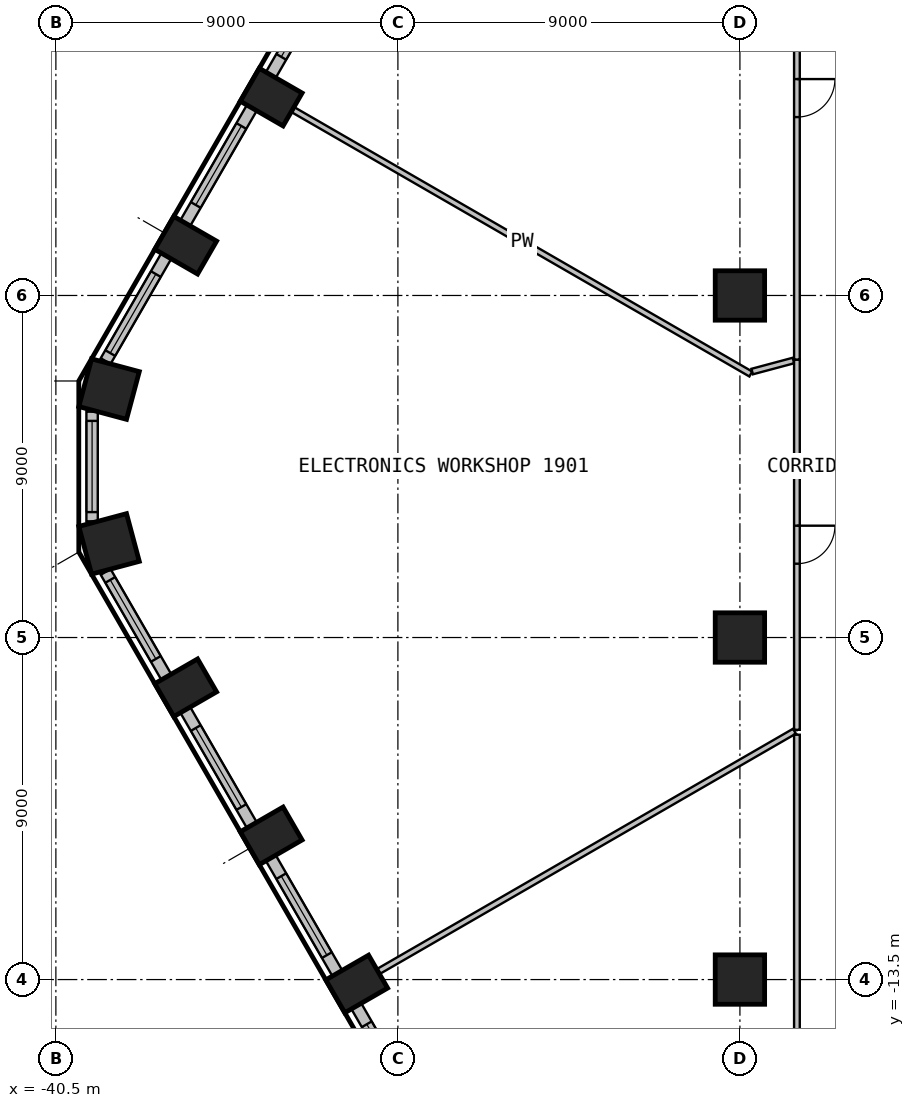
"""IFC4 building model, lengths in metres.
Left out: names, types, materials, properties, quantities, classifications, styles, units other than length and angle.
Written with IfcOpenShell. Run it as: python <this file> out.ifc"""

import sys

from ifc_helpers import new_model, si_unit, direction, frame, frame_2d, origin, origin_2d, place, context, subcontext, project, spatial, rectangle, circle, extrude, element, fill, save


model = new_model("IFC4")
c1 = context("Model", 3, precision=1e-05, world=origin(), true_north=direction((0.0, 1.0)))
c2 = subcontext(c1, "Body", "Model", "MODEL_VIEW")
j1 = project(units=[si_unit("LENGTHUNIT", "METRE"), si_unit("PLANEANGLEUNIT", "RADIAN")], contexts=[c1])
p1 = place(None, origin())
s1 = spatial("IfcSite", under=j1, at=p1, CompositionType="ELEMENT")
p2 = place(p1, origin())
s2 = spatial("IfcBuilding", under=s1, at=p2, CompositionType="ELEMENT")
p3 = place(p2, frame((0.0, 0.0, 81.3)))
s3 = spatial("IfcBuildingStorey", under=s2, at=p3, CompositionType="ELEMENT", Elevation=81.3)
for number, where, z_axis, x_axis in (
    (1, (-34.834, 9.719, 0.0), (0.0, 0.0, 1.0), (-0.5, -0.866, 0.0)),
    (2, (-37.084, 5.822, 0.0), (0.0, 0.0, 1.0), (-0.5, -0.866, 0.0)),
):
    element("IfcColumn", number, at=place(p3, frame(where, z_axis=z_axis, x_axis=x_axis)), inside=s3, PredefinedType="COLUMN", context=c2, shape_type="SweptSolid", body=[
        extrude(rectangle(XDim=1.0, YDim=1.3, at=origin_2d()), origin(), (0.0, 0.0, 1.0), 3.525),
    ])
for number, where, z_axis, x_axis in (
    (3, (-39.101, 2.037, 0.0), (0.0, 0.0, 1.0), (-0.259, -0.966, 0.0)),
    (4, (-39.101, -2.037, 0.0), (0.0, 0.0, 1.0), (0.259, -0.966, 0.0)),
):
    element("IfcColumn", number, at=place(p3, frame(where, z_axis=z_axis, x_axis=x_axis)), inside=s3, PredefinedType="COLUMN", context=c2, shape_type="SweptSolid", body=[
        extrude(rectangle(XDim=1.3, YDim=1.3, at=origin_2d()), origin(), (0.0, 0.0, 1.0), 3.525),
    ])
for number, where, z_axis, x_axis in (
    (5, (-37.084, -5.822, 0.0), (0.0, 0.0, 1.0), (0.5, -0.866, 0.0)),
    (6, (-34.834, -9.719, 0.0), (0.0, 0.0, 1.0), (0.5, -0.866, 0.0)),
    (7, (-32.584, -13.616, 0.0), (0.0, 0.0, 1.0), (0.5, -0.866, 0.0)),
):
    element("IfcColumn", number, at=place(p3, frame(where, z_axis=z_axis, x_axis=x_axis)), inside=s3, PredefinedType="COLUMN", context=c2, shape_type="SweptSolid", body=[
        extrude(rectangle(XDim=1.0, YDim=1.3, at=origin_2d()), origin(), (0.0, 0.0, 1.0), 3.525),
    ])
for number, where, z_axis, x_axis in (
    (8, (-22.5, -13.5, 0.0), (0.0, 0.0, 1.0), (1.0, 0.0, 0.0)),
    (9, (-22.5, -4.5, 0.0), (0.0, 0.0, 1.0), (1.0, 0.0, 0.0)),
    (10, (-22.5, 4.5, 0.0), (0.0, 0.0, 1.0), (1.0, 0.0, 0.0)),
):
    element("IfcColumn", number, at=place(p3, frame(where, z_axis=z_axis, x_axis=x_axis)), inside=s3, PredefinedType="COLUMN", context=c2, shape_type="SweptSolid", body=[
        extrude(circle(Radius=0.65, at=origin_2d()), origin(), (0.0, 0.0, 1.0), 3.525),
    ])
p4 = place(p3, frame((-33.094, 13.333, 0.0), z_axis=(0.0, 0.0, 1.0), x_axis=(-0.499996256241, -0.866027565234, 0.0)))
e11 = element("IfcWall", 11, at=p4, inside=s3, PredefinedType="SOLIDWALL", context=c2, shape_type="SweptSolid", body=[
    extrude(rectangle(XDim=3.499, YDim=0.3, at=frame_2d((1.75, 0.0))), origin(), (0.0, 0.0, 1.0), 3.525),
])
p5 = place(p4, frame((0.55, 0.0, 0.9)))
e12 = element("IfcOpeningElement", 12, at=p5, cuts=e11, PredefinedType="OPENING", context=c2, shape_type="SweptSolid", body=[
    extrude(rectangle(XDim=2.4, YDim=2.1, at=frame_2d((1.2, 1.05))), frame((0.0, 0.16, 0.0), z_axis=(0.0, -1.0, 0.0), x_axis=(1.0, 0.0, 0.0)), (0.0, 0.0, 1.0), 0.32),
])
p6 = place(p3, frame((-35.344, 9.436, 0.0), z_axis=(0.0, 0.0, 1.0), x_axis=(-0.499996256241, -0.866027565234, 0.0)))
e13 = element("IfcWall", 13, at=p6, inside=s3, PredefinedType="SOLIDWALL", context=c2, shape_type="SweptSolid", body=[
    extrude(rectangle(XDim=3.499, YDim=0.3, at=frame_2d((1.75, 0.0))), origin(), (0.0, 0.0, 1.0), 3.525),
])
p7 = place(p6, frame((0.55, 0.0, 0.9)))
e14 = element("IfcOpeningElement", 14, at=p7, cuts=e13, PredefinedType="OPENING", context=c2, shape_type="SweptSolid", body=[
    extrude(rectangle(XDim=2.4, YDim=2.1, at=frame_2d((1.2, 1.05))), frame((0.0, 0.16, 0.0), z_axis=(0.0, -1.0, 0.0), x_axis=(1.0, 0.0, 0.0)), (0.0, 0.0, 1.0), 0.32),
])
p8 = place(p3, frame((-37.594, 5.539, 0.0), z_axis=(0.0, 0.0, 1.0), x_axis=(-0.500004907028, -0.866022570692, 0.0)))
e15 = element("IfcWall", 15, at=p8, inside=s3, PredefinedType="SOLIDWALL", context=c2, shape_type="SweptSolid", body=[
    extrude(rectangle(XDim=3.192, YDim=0.3, at=frame_2d((1.596, 0.0))), origin(), (0.0, 0.0, 1.0), 3.525),
])
p9 = place(p8, frame((0.55, 0.0, 0.9)))
e16 = element("IfcOpeningElement", 16, at=p9, cuts=e15, PredefinedType="OPENING", context=c2, shape_type="SweptSolid", body=[
    extrude(rectangle(XDim=2.4, YDim=2.1, at=frame_2d((1.2, 1.05))), frame((0.0, 0.16, 0.0), z_axis=(0.0, -1.0, 0.0), x_axis=(1.0, 0.0, 0.0)), (0.0, 0.0, 1.0), 0.32),
])
p10 = place(p3, frame((-39.547, 1.443, 0.0), z_axis=(0.0, 0.0, 1.0), x_axis=(0.0, -1.0, 0.0)))
e17 = element("IfcWall", 17, at=p10, inside=s3, PredefinedType="SOLIDWALL", context=c2, shape_type="SweptSolid", body=[
    extrude(rectangle(XDim=2.886, YDim=0.3, at=frame_2d((1.443, 0.0))), origin(), (0.0, 0.0, 1.0), 3.525),
])
p11 = place(p10, frame((0.243, 0.0, 0.9)))
e18 = element("IfcOpeningElement", 18, at=p11, cuts=e17, PredefinedType="OPENING", context=c2, shape_type="SweptSolid", body=[
    extrude(rectangle(XDim=2.4, YDim=2.1, at=frame_2d((1.2, 1.05))), frame((0.0, 0.16, 0.0), z_axis=(0.0, -1.0, 0.0), x_axis=(1.0, 0.0, 0.0)), (0.0, 0.0, 1.0), 0.32),
])
p12 = place(p3, frame((-39.19, -2.774, 0.0), z_axis=(0.0, 0.0, 1.0), x_axis=(0.500004907028, -0.866022570692, 0.0)))
e19 = element("IfcWall", 19, at=p12, inside=s3, PredefinedType="SOLIDWALL", context=c2, shape_type="SweptSolid", body=[
    extrude(rectangle(XDim=3.192, YDim=0.3, at=frame_2d((1.596, 0.0))), origin(), (0.0, 0.0, 1.0), 3.525),
])
p13 = place(p12, frame((0.243, 0.0, 0.9)))
e20 = element("IfcOpeningElement", 20, at=p13, cuts=e19, PredefinedType="OPENING", context=c2, shape_type="SweptSolid", body=[
    extrude(rectangle(XDim=2.4, YDim=2.1, at=frame_2d((1.2, 1.05))), frame((0.0, 0.16, 0.0), z_axis=(0.0, -1.0, 0.0), x_axis=(1.0, 0.0, 0.0)), (0.0, 0.0, 1.0), 0.32),
])
p14 = place(p3, frame((-37.094, -6.406, 0.0), z_axis=(0.0, 0.0, 1.0), x_axis=(0.499996256241, -0.866027565234, 0.0)))
e21 = element("IfcWall", 21, at=p14, inside=s3, PredefinedType="SOLIDWALL", context=c2, shape_type="SweptSolid", body=[
    extrude(rectangle(XDim=3.499, YDim=0.3, at=frame_2d((1.75, 0.0))), origin(), (0.0, 0.0, 1.0), 3.525),
])
p15 = place(p14, frame((0.55, 0.0, 0.9)))
e22 = element("IfcOpeningElement", 22, at=p15, cuts=e21, PredefinedType="OPENING", context=c2, shape_type="SweptSolid", body=[
    extrude(rectangle(XDim=2.4, YDim=2.1, at=frame_2d((1.2, 1.05))), frame((0.0, 0.16, 0.0), z_axis=(0.0, -1.0, 0.0), x_axis=(1.0, 0.0, 0.0)), (0.0, 0.0, 1.0), 0.32),
])
p16 = place(p3, frame((-34.844, -10.303, 0.0), z_axis=(0.0, 0.0, 1.0), x_axis=(0.499996256241, -0.866027565234, 0.0)))
e23 = element("IfcWall", 23, at=p16, inside=s3, PredefinedType="SOLIDWALL", context=c2, shape_type="SweptSolid", body=[
    extrude(rectangle(XDim=3.499, YDim=0.3, at=frame_2d((1.75, 0.0))), origin(), (0.0, 0.0, 1.0), 3.525),
])
p17 = place(p16, frame((0.55, 0.0, 0.9)))
e24 = element("IfcOpeningElement", 24, at=p17, cuts=e23, PredefinedType="OPENING", context=c2, shape_type="SweptSolid", body=[
    extrude(rectangle(XDim=2.4, YDim=2.1, at=frame_2d((1.2, 1.05))), frame((0.0, 0.16, 0.0), z_axis=(0.0, -1.0, 0.0), x_axis=(1.0, 0.0, 0.0)), (0.0, 0.0, 1.0), 0.32),
])
p18 = place(p3, frame((-32.594, -14.2, 0.0), z_axis=(0.0, 0.0, 1.0), x_axis=(0.499996256241, -0.866027565234, 0.0)))
e25 = element("IfcWall", 25, at=p18, inside=s3, PredefinedType="SOLIDWALL", context=c2, shape_type="SweptSolid", body=[
    extrude(rectangle(XDim=3.499, YDim=0.3, at=frame_2d((1.75, 0.0))), origin(), (0.0, 0.0, 1.0), 3.525),
])
p19 = place(p18, frame((0.55, 0.0, 0.9)))
e26 = element("IfcOpeningElement", 26, at=p19, cuts=e25, PredefinedType="OPENING", context=c2, shape_type="SweptSolid", body=[
    extrude(rectangle(XDim=2.4, YDim=2.1, at=frame_2d((1.2, 1.05))), frame((0.0, 0.16, 0.0), z_axis=(0.0, -1.0, 0.0), x_axis=(1.0, 0.0, 0.0)), (0.0, 0.0, 1.0), 0.32),
])
p20 = place(p3, frame((-34.254, 9.384, 0.0), z_axis=(0.0, 0.0, 1.0), x_axis=(0.866040828911, -0.499973281945, 0.0)))
e27 = element("IfcWall", 27, at=p20, inside=s3, PredefinedType="PARTITIONING", context=c2, shape_type="SweptSolid", body=[
    extrude(rectangle(XDim=13.902, YDim=0.15, at=frame_2d((6.951, 0.0))), origin(), (0.0, 0.0, 1.0), 3.525),
])
p21 = place(p3, frame((-21.065, -6.966, 0.0), z_axis=(0.0, 0.0, 1.0), x_axis=(-0.866023362995, -0.500003534735, 0.0)))
e28 = element("IfcWall", 28, at=p21, inside=s3, PredefinedType="PARTITIONING", context=c2, shape_type="SweptSolid", body=[
    extrude(rectangle(XDim=12.631, YDim=0.15, at=frame_2d((6.316, 0.0))), origin(), (0.0, 0.0, 1.0), 3.525),
])
p22 = place(p3, frame((-22.177, 2.498, 0.0), z_axis=(0.0, 0.0, 1.0), x_axis=(0.966065265568, 0.25829808877, 0.0)))
e29 = element("IfcWall", 29, at=p22, inside=s3, PredefinedType="PARTITIONING", context=c2, shape_type="SweptSolid", body=[
    extrude(rectangle(XDim=1.124, YDim=0.15, at=frame_2d((0.562, 0.0))), origin(), (0.0, 0.0, 1.0), 3.525),
])
p23 = place(p3, frame((-21.0, -7.058, 0.0), z_axis=(0.0, 0.0, 1.0), x_axis=(0.0, -1.0, 0.0)))
e30 = element("IfcWall", 30, at=p23, inside=s3, PredefinedType="PARTITIONING", context=c2, shape_type="SweptSolid", body=[
    extrude(rectangle(XDim=9.517, YDim=0.15, at=frame_2d((4.758, 0.0))), origin(), (0.0, 0.0, 1.0), 3.525),
])
p24 = place(p3, frame((-21.0, 2.813, 0.0), z_axis=(0.0, 0.0, 1.0), x_axis=(0.0, -1.0, 0.0)))
e31 = element("IfcWall", 31, at=p24, inside=s3, PredefinedType="PARTITIONING", context=c2, shape_type="SweptSolid", body=[
    extrude(rectangle(XDim=9.741, YDim=0.15, at=frame_2d((4.871, 0.0))), origin(), (0.0, 0.0, 1.0), 3.525),
])
p25 = place(p24, frame((4.371, 0.0, 0.0)))
e32 = element("IfcOpeningElement", 32, at=p25, cuts=e31, PredefinedType="OPENING", context=c2, shape_type="SweptSolid", body=[
    extrude(rectangle(XDim=1.0, YDim=2.1, at=frame_2d((0.5, 1.05))), frame((0.0, 0.085, 0.0), z_axis=(0.0, -1.0, 0.0), x_axis=(1.0, 0.0, 0.0)), (0.0, 0.0, 1.0), 0.17),
])
p26 = place(p3, frame((-21.0, 16.575, 0.0), z_axis=(0.0, 0.0, 1.0), x_axis=(0.0, -1.0, 0.0)))
e33 = element("IfcWall", 33, at=p26, inside=s3, PredefinedType="PARTITIONING", context=c2, shape_type="SweptSolid", body=[
    extrude(rectangle(XDim=13.762, YDim=0.15, at=frame_2d((6.881, 0.0))), origin(), (0.0, 0.0, 1.0), 3.525),
])
p27 = place(p26, frame((6.381, 0.0, 0.0)))
e34 = element("IfcOpeningElement", 34, at=p27, cuts=e33, PredefinedType="OPENING", context=c2, shape_type="SweptSolid", body=[
    extrude(rectangle(XDim=1.0, YDim=2.1, at=frame_2d((0.5, 1.05))), frame((0.0, 0.085, 0.0), z_axis=(0.0, -1.0, 0.0), x_axis=(1.0, 0.0, 0.0)), (0.0, 0.0, 1.0), 0.17),
])
p28 = place(p5, origin())
e35 = element("IfcWindow", 35, at=p28, inside=s3, PartitioningType="SINGLE_PANEL", PredefinedType="WINDOW", context=c2, shape_type="SweptSolid", body=[
    extrude(rectangle(XDim=2.4, YDim=2.1, at=frame_2d((1.2, 1.05))), frame((0.0, 0.03, 0.0), z_axis=(0.0, -1.0, 0.0), x_axis=(1.0, 0.0, 0.0)), (0.0, 0.0, 1.0), 0.06),
])
fill(e12, e35)
p29 = place(p7, origin())
e36 = element("IfcWindow", 36, at=p29, inside=s3, PartitioningType="SINGLE_PANEL", PredefinedType="WINDOW", context=c2, shape_type="SweptSolid", body=[
    extrude(rectangle(XDim=2.4, YDim=2.1, at=frame_2d((1.2, 1.05))), frame((0.0, 0.03, 0.0), z_axis=(0.0, -1.0, 0.0), x_axis=(1.0, 0.0, 0.0)), (0.0, 0.0, 1.0), 0.06),
])
fill(e14, e36)
p30 = place(p9, origin())
e37 = element("IfcWindow", 37, at=p30, inside=s3, PartitioningType="SINGLE_PANEL", PredefinedType="WINDOW", context=c2, shape_type="SweptSolid", body=[
    extrude(rectangle(XDim=2.4, YDim=2.1, at=frame_2d((1.2, 1.05))), frame((0.0, 0.03, 0.0), z_axis=(0.0, -1.0, 0.0), x_axis=(1.0, 0.0, 0.0)), (0.0, 0.0, 1.0), 0.06),
])
fill(e16, e37)
p31 = place(p11, origin())
e38 = element("IfcWindow", 38, at=p31, inside=s3, PartitioningType="SINGLE_PANEL", PredefinedType="WINDOW", context=c2, shape_type="SweptSolid", body=[
    extrude(rectangle(XDim=2.4, YDim=2.1, at=frame_2d((1.2, 1.05))), frame((0.0, 0.03, 0.0), z_axis=(0.0, -1.0, 0.0), x_axis=(1.0, 0.0, 0.0)), (0.0, 0.0, 1.0), 0.06),
])
fill(e18, e38)
p32 = place(p13, origin())
e39 = element("IfcWindow", 39, at=p32, inside=s3, PartitioningType="SINGLE_PANEL", PredefinedType="WINDOW", context=c2, shape_type="SweptSolid", body=[
    extrude(rectangle(XDim=2.4, YDim=2.1, at=frame_2d((1.2, 1.05))), frame((0.0, 0.03, 0.0), z_axis=(0.0, -1.0, 0.0), x_axis=(1.0, 0.0, 0.0)), (0.0, 0.0, 1.0), 0.06),
])
fill(e20, e39)
p33 = place(p15, origin())
e40 = element("IfcWindow", 40, at=p33, inside=s3, PartitioningType="SINGLE_PANEL", PredefinedType="WINDOW", context=c2, shape_type="SweptSolid", body=[
    extrude(rectangle(XDim=2.4, YDim=2.1, at=frame_2d((1.2, 1.05))), frame((0.0, 0.03, 0.0), z_axis=(0.0, -1.0, 0.0), x_axis=(1.0, 0.0, 0.0)), (0.0, 0.0, 1.0), 0.06),
])
fill(e22, e40)
p34 = place(p17, origin())
e41 = element("IfcWindow", 41, at=p34, inside=s3, PartitioningType="SINGLE_PANEL", PredefinedType="WINDOW", context=c2, shape_type="SweptSolid", body=[
    extrude(rectangle(XDim=2.4, YDim=2.1, at=frame_2d((1.2, 1.05))), frame((0.0, 0.03, 0.0), z_axis=(0.0, -1.0, 0.0), x_axis=(1.0, 0.0, 0.0)), (0.0, 0.0, 1.0), 0.06),
])
fill(e24, e41)
p35 = place(p19, origin())
e42 = element("IfcWindow", 42, at=p35, inside=s3, PartitioningType="SINGLE_PANEL", PredefinedType="WINDOW", context=c2, shape_type="SweptSolid", body=[
    extrude(rectangle(XDim=2.4, YDim=2.1, at=frame_2d((1.2, 1.05))), frame((0.0, 0.03, 0.0), z_axis=(0.0, -1.0, 0.0), x_axis=(1.0, 0.0, 0.0)), (0.0, 0.0, 1.0), 0.06),
])
fill(e26, e42)
p36 = place(p25, origin())
e43 = element("IfcDoor", 43, at=p36, inside=s3, OperationType="SINGLE_SWING_RIGHT", PredefinedType="DOOR", context=c2, shape_type="SweptSolid", body=[
    extrude(rectangle(XDim=1.0, YDim=2.1, at=frame_2d((0.5, 1.05))), frame((0.0, 0.025, 0.0), z_axis=(0.0, -1.0, 0.0), x_axis=(1.0, 0.0, 0.0)), (0.0, 0.0, 1.0), 0.05),
])
fill(e32, e43)
p37 = place(p27, origin())
e44 = element("IfcDoor", 44, at=p37, inside=s3, OperationType="SINGLE_SWING_RIGHT", PredefinedType="DOOR", context=c2, shape_type="SweptSolid", body=[
    extrude(rectangle(XDim=1.0, YDim=2.1, at=frame_2d((0.5, 1.05))), frame((0.0, 0.025, 0.0), z_axis=(0.0, -1.0, 0.0), x_axis=(1.0, 0.0, 0.0)), (0.0, 0.0, 1.0), 0.05),
])
fill(e34, e44)
save(model, sys.argv[1])
